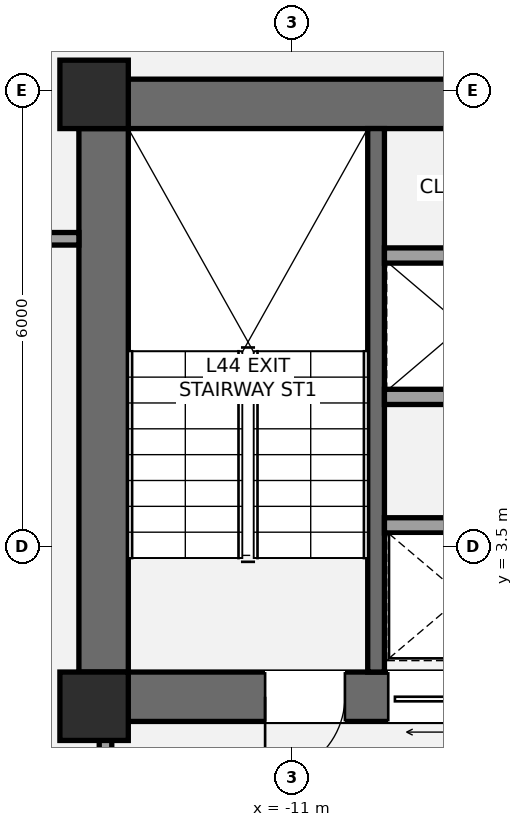
"""IFC4 building model, lengths in metres.
Left out: names, types, materials, properties, quantities, classifications, styles, units other than length and angle.
Written with IfcOpenShell. Run it as: python <this file> out.ifc"""

import sys

from ifc_helpers import new_model, si_unit, direction, frame, frame_2d, origin, origin_2d, place, context, subcontext, project, spatial, rectangle, extrude, element, fill, save


model = new_model("IFC4")
c1 = context("Model", 3, precision=1e-05, world=origin(), true_north=direction((0.0, 1.0)))
c2 = subcontext(c1, "Body", "Model", "MODEL_VIEW")
j1 = project(units=[si_unit("LENGTHUNIT", "METRE"), si_unit("PLANEANGLEUNIT", "RADIAN")], contexts=[c1])
p1 = place(None, origin())
s1 = spatial("IfcSite", under=j1, at=p1, CompositionType="ELEMENT")
p2 = place(p1, origin())
s2 = spatial("IfcBuilding", under=s1, at=p2, CompositionType="ELEMENT")
p3 = place(p2, frame((0.0, 0.0, 163.0)))
s3 = spatial("IfcBuildingStorey", under=s2, at=p3, CompositionType="ELEMENT", Elevation=163.0)
p4 = place(p3, frame((-13.475, 1.2, 0.0), z_axis=(0.0, 0.0, 1.0), x_axis=(0.0, 1.0, 0.0)))
e1 = element("IfcWall", 1, at=p4, inside=s3, PredefinedType="SHEAR", context=c2, shape_type="SweptSolid", body=[
    extrude(rectangle(XDim=8.45, YDim=0.65, at=frame_2d((4.225, 0.0))), origin(), (0.0, 0.0, 1.0), 3.2),
])
p5 = place(p3, frame((-13.8, 9.325, 0.0), z_axis=(0.0, 0.0, 1.0), x_axis=(1.0, 0.0, 0.0)))
e2 = element("IfcWall", 2, at=p5, inside=s3, PredefinedType="SHEAR", context=c2, shape_type="SweptSolid", body=[
    extrude(rectangle(XDim=9.325, YDim=0.65, at=frame_2d((4.663, 0.0))), origin(), (0.0, 0.0, 1.0), 3.2),
])
p6 = place(p3, frame((-4.875, 1.525, 0.0), z_axis=(0.0, 0.0, 1.0), x_axis=(-1.0, 0.0, 0.0)))
e3 = element("IfcWall", 3, at=p6, inside=s3, PredefinedType="SHEAR", context=c2, shape_type="SweptSolid", body=[
    extrude(rectangle(XDim=8.925, YDim=0.65, at=frame_2d((4.462, 0.0))), origin(), (0.0, 0.0, 1.0), 3.2),
])
p7 = place(p6, frame((5.425, 0.0, 0.0)))
e4 = element("IfcOpeningElement", 4, at=p7, cuts=e3, PredefinedType="OPENING", context=c2, shape_type="SweptSolid", body=[
    extrude(rectangle(XDim=1.05, YDim=2.15, at=frame_2d((0.525, 1.075))), frame((0.0, 0.335, 0.0), z_axis=(0.0, -1.0, 0.0), x_axis=(1.0, 0.0, 0.0)), (0.0, 0.0, 1.0), 0.67),
])
p8 = place(p6, frame((3.755, 0.0, 0.0)))
e5 = element("IfcOpeningElement", 5, at=p8, cuts=e3, PredefinedType="OPENING", context=c2, shape_type="SweptSolid", body=[
    extrude(rectangle(XDim=1.1, YDim=2.2, at=frame_2d((0.55, 1.1))), frame((0.0, 0.335, 0.0), z_axis=(0.0, -1.0, 0.0), x_axis=(1.0, 0.0, 0.0)), (0.0, 0.0, 1.0), 0.67),
])
p9 = place(p3, frame((-9.89, 1.85, 0.0), z_axis=(0.0, 0.0, 1.0), x_axis=(0.0, 1.0, 0.0)))
e6 = element("IfcWall", 6, at=p9, inside=s3, PredefinedType="SHEAR", context=c2, shape_type="SweptSolid", body=[
    extrude(rectangle(XDim=7.15, YDim=0.22, at=frame_2d((3.575, 0.0))), origin(), (0.0, 0.0, 1.0), 3.2),
])
for number, where, z_axis, x_axis in (
    (7, (-13.6, 1.4, 0.0), (0.0, 0.0, 1.0), (1.0, 0.0, 0.0)),
    (8, (-13.6, 9.45, 0.0), (0.0, 0.0, 1.0), (1.0, 0.0, 0.0)),
):
    element("IfcColumn", number, at=place(p3, frame(where, z_axis=z_axis, x_axis=x_axis)), inside=s3, PredefinedType="COLUMN", context=c2, shape_type="SweptSolid", body=[
        extrude(rectangle(XDim=0.9, YDim=0.9, at=origin_2d()), origin(), (0.0, 0.0, 1.0), 3.2),
    ])
p10 = place(p3, frame((-13.45, -2.15, 0.0), z_axis=(0.0, 0.0, 1.0), x_axis=(0.0, 1.0, 0.0)))
e9 = element("IfcWall", 9, at=p10, inside=s3, PredefinedType="PARTITIONING", context=c2, shape_type="SweptSolid", body=[
    extrude(rectangle(XDim=3.4, YDim=0.165, at=frame_2d((1.7, 0.0))), origin(), (0.0, 0.0, 1.0), 2.473),
])
p11 = place(p10, frame((1.15, 0.0, 0.0)))
e10 = element("IfcOpeningElement", 10, at=p11, cuts=e9, PredefinedType="OPENING", context=c2, shape_type="SweptSolid", body=[
    extrude(rectangle(XDim=1.05, YDim=2.15, at=frame_2d((0.525, 1.075))), frame((0.0, 0.093, 0.0), z_axis=(0.0, -1.0, 0.0), x_axis=(1.0, 0.0, 0.0)), (0.0, 0.0, 1.0), 0.185),
])
for number, where, z_axis, x_axis in (
    (11, (-9.78, 3.78, 0.0), (0.0, 0.0, 1.0), (1.0, 0.0, 0.0)),
    (12, (-9.78, 5.47, 0.0), (0.0, 0.0, 1.0), (1.0, 0.0, 0.0)),
    (13, (-9.78, 7.33, 0.0), (0.0, 0.0, 1.0), (1.0, 0.0, 0.0)),
):
    element("IfcWall", number, at=place(p3, frame(where, z_axis=z_axis, x_axis=x_axis)), inside=s3, PredefinedType="SOLIDWALL", context=c2, shape_type="SweptSolid", body=[
        extrude(rectangle(XDim=4.255, YDim=0.2, at=frame_2d((2.127, 0.0))), origin(), (0.0, 0.0, 1.0), 3.02),
    ])
p12 = place(p3, frame((-15.95, 7.55, 0.0), z_axis=(0.0, 0.0, 1.0), x_axis=(1.0, 0.0, 0.0)))
e14 = element("IfcWall", 14, at=p12, inside=s3, PredefinedType="PARTITIONING", context=c2, shape_type="SweptSolid", body=[
    extrude(rectangle(XDim=2.15, YDim=0.165, at=frame_2d((1.075, 0.0))), origin(), (0.0, 0.0, 1.0), 3.02),
])
p13 = place(p12, frame((0.3, 0.0, 0.0)))
e15 = element("IfcOpeningElement", 15, at=p13, cuts=e14, PredefinedType="OPENING", context=c2, shape_type="SweptSolid", body=[
    extrude(rectangle(XDim=1.0, YDim=2.15, at=frame_2d((0.5, 1.075))), frame((0.0, 0.093, 0.0), z_axis=(0.0, -1.0, 0.0), x_axis=(1.0, 0.0, 0.0)), (0.0, 0.0, 1.0), 0.185),
])
p14 = place(p7, origin())
e16 = element("IfcDoor", 16, at=p14, inside=s3, OperationType="SINGLE_SWING_RIGHT", PredefinedType="DOOR", context=c2, shape_type="SweptSolid", body=[
    extrude(rectangle(XDim=1.05, YDim=2.15, at=frame_2d((0.525, 1.075))), frame((0.0, 0.025, 0.0), z_axis=(0.0, -1.0, 0.0), x_axis=(1.0, 0.0, 0.0)), (0.0, 0.0, 1.0), 0.05),
])
fill(e4, e16)
p15 = place(p8, origin())
e17 = element("IfcDoor", 17, at=p15, inside=s3, OperationType="SLIDING_TO_LEFT", PredefinedType="DOOR", context=c2, shape_type="SweptSolid", body=[
    extrude(rectangle(XDim=1.1, YDim=2.2, at=frame_2d((0.55, 1.1))), frame((0.0, 0.025, 0.0), z_axis=(0.0, -1.0, 0.0), x_axis=(1.0, 0.0, 0.0)), (0.0, 0.0, 1.0), 0.05),
])
fill(e5, e17)
save(model, sys.argv[1])
